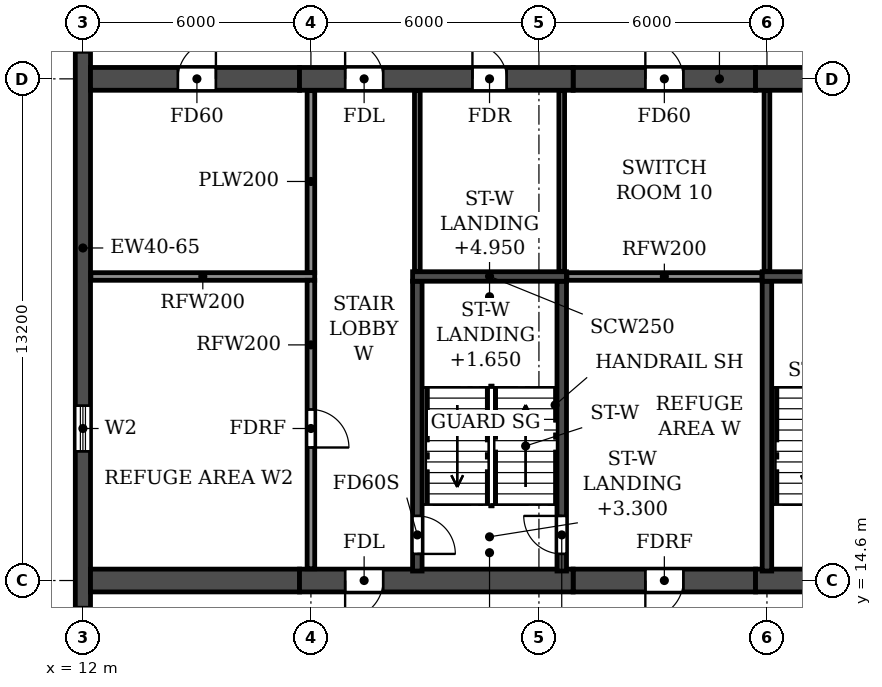
"""IFC4 building model, lengths in metres.
Left out: names, types, materials, properties, quantities, classifications, styles, units other than length and angle.
Written with IfcOpenShell. Run it as: python <this file> out.ifc"""

import sys

from ifc_helpers import new_model, si_unit, direction, frame, frame_2d, origin, place, context, subcontext, project, spatial, rectangle, extrude, element, fill, save


model = new_model("IFC4")
c1 = context("Model", 3, precision=1e-05, world=origin(), true_north=direction((0.0, 1.0)))
c2 = subcontext(c1, "Body", "Model", "MODEL_VIEW")
j1 = project(units=[si_unit("LENGTHUNIT", "METRE"), si_unit("PLANEANGLEUNIT", "RADIAN")], contexts=[c1])
p1 = place(None, origin())
s1 = spatial("IfcSite", under=j1, at=p1, CompositionType="ELEMENT")
p2 = place(p1, origin())
s2 = spatial("IfcBuilding", under=s1, at=p2, CompositionType="ELEMENT")
p3 = place(p2, frame((0.0, 0.0, 115.8)))
s3 = spatial("IfcBuildingStorey", under=s2, at=p3, CompositionType="ELEMENT", Elevation=115.8)
p4 = place(p3, frame((12.0, 4.683, 0.0), z_axis=(0.0, 0.0, 1.0), x_axis=(0.0, 1.0, 0.0)))
e1 = element("IfcWall", 1, at=p4, inside=s3, PredefinedType="SHEAR", context=c2, shape_type="SweptSolid", body=[
    extrude(rectangle(XDim=34.234, YDim=0.4, at=frame_2d((17.117, 0.0))), origin(), (0.0, 0.0, 1.0), 6.37),
])
p5 = place(p4, frame((23.817, 0.0, 0.9)))
e2 = element("IfcOpeningElement", 2, at=p5, cuts=e1, PredefinedType="OPENING", context=c2, shape_type="SweptSolid", body=[
    extrude(rectangle(XDim=1.2, YDim=1.5, at=frame_2d((0.6, 0.75))), frame((0.0, 0.21, 0.0), z_axis=(0.0, -1.0, 0.0), x_axis=(1.0, 0.0, 0.0)), (0.0, 0.0, 1.0), 0.42),
])
p6 = place(p4, frame((8.017, 0.0, 0.9)))
e3 = element("IfcOpeningElement", 3, at=p6, cuts=e1, PredefinedType="OPENING", context=c2, shape_type="SweptSolid", body=[
    extrude(rectangle(XDim=1.2, YDim=1.5, at=frame_2d((0.6, 0.75))), frame((0.0, 0.21, 0.0), z_axis=(0.0, -1.0, 0.0), x_axis=(1.0, 0.0, 0.0)), (0.0, 0.0, 1.0), 0.42),
])
p7 = place(p4, frame((13.317, 0.0, 0.9)))
e4 = element("IfcOpeningElement", 4, at=p7, cuts=e1, PredefinedType="OPENING", context=c2, shape_type="SweptSolid", body=[
    extrude(rectangle(XDim=1.2, YDim=1.5, at=frame_2d((0.6, 0.75))), frame((0.0, 0.21, 0.0), z_axis=(0.0, -1.0, 0.0), x_axis=(1.0, 0.0, 0.0)), (0.0, 0.0, 1.0), 0.42),
])
p8 = place(p3, frame((12.2, 14.6, 0.0), z_axis=(0.0, 0.0, 1.0), x_axis=(1.0, 0.0, 0.0)))
e5 = element("IfcWall", 5, at=p8, inside=s3, PredefinedType="SHEAR", context=c2, shape_type="SweptSolid", body=[
    extrude(rectangle(XDim=5.5, YDim=0.6, at=frame_2d((2.75, 0.0))), origin(), (0.0, 0.0, 1.0), 6.37),
])
p9 = place(p3, frame((24.9, 14.6, 0.0), z_axis=(0.0, 0.0, 1.0), x_axis=(1.0, 0.0, 0.0)))
e6 = element("IfcWall", 6, at=p9, inside=s3, PredefinedType="SHEAR", context=c2, shape_type="SweptSolid", body=[
    extrude(rectangle(XDim=4.8, YDim=0.6, at=frame_2d((2.4, 0.0))), origin(), (0.0, 0.0, 1.0), 6.37),
])
p10 = place(p9, frame((1.9, 0.0, 0.0)))
e7 = element("IfcOpeningElement", 7, at=p10, cuts=e6, PredefinedType="OPENING", context=c2, shape_type="SweptSolid", body=[
    extrude(rectangle(XDim=1.0, YDim=2.1, at=frame_2d((0.5, 1.05))), frame((0.0, 0.31, 0.0), z_axis=(0.0, -1.0, 0.0), x_axis=(1.0, 0.0, 0.0)), (0.0, 0.0, 1.0), 0.62),
])
p11 = place(p3, frame((12.2, 27.8, 0.0), z_axis=(0.0, 0.0, 1.0), x_axis=(1.0, 0.0, 0.0)))
e8 = element("IfcWall", 8, at=p11, inside=s3, PredefinedType="SHEAR", context=c2, shape_type="SweptSolid", body=[
    extrude(rectangle(XDim=5.5, YDim=0.6, at=frame_2d((2.75, 0.0))), origin(), (0.0, 0.0, 1.0), 6.37),
])
p12 = place(p11, frame((2.3, 0.0, 0.0)))
e9 = element("IfcOpeningElement", 9, at=p12, cuts=e8, PredefinedType="OPENING", context=c2, shape_type="SweptSolid", body=[
    extrude(rectangle(XDim=1.0, YDim=2.1, at=frame_2d((0.5, 1.05))), frame((0.0, 0.31, 0.0), z_axis=(0.0, -1.0, 0.0), x_axis=(1.0, 0.0, 0.0)), (0.0, 0.0, 1.0), 0.62),
])
p13 = place(p3, frame((24.9, 27.8, 0.0), z_axis=(0.0, 0.0, 1.0), x_axis=(1.0, 0.0, 0.0)))
e10 = element("IfcWall", 10, at=p13, inside=s3, PredefinedType="SHEAR", context=c2, shape_type="SweptSolid", body=[
    extrude(rectangle(XDim=4.8, YDim=0.6, at=frame_2d((2.4, 0.0))), origin(), (0.0, 0.0, 1.0), 6.37),
])
p14 = place(p13, frame((1.9, 0.0, 0.0)))
e11 = element("IfcOpeningElement", 11, at=p14, cuts=e10, PredefinedType="OPENING", context=c2, shape_type="SweptSolid", body=[
    extrude(rectangle(XDim=1.0, YDim=2.1, at=frame_2d((0.5, 1.05))), frame((0.0, 0.31, 0.0), z_axis=(0.0, -1.0, 0.0), x_axis=(1.0, 0.0, 0.0)), (0.0, 0.0, 1.0), 0.62),
])
p15 = place(p3, frame((17.7, 14.6, 0.0), z_axis=(0.0, 0.0, 1.0), x_axis=(1.0, 0.0, 0.0)))
e12 = element("IfcWall", 12, at=p15, inside=s3, PredefinedType="SOLIDWALL", context=c2, shape_type="SweptSolid", body=[
    extrude(rectangle(XDim=7.2, YDim=0.6, at=frame_2d((3.6, 0.0))), origin(), (0.0, 0.0, 1.0), 6.37),
])
p16 = place(p15, frame((1.2, 0.0, 0.0)))
e13 = element("IfcOpeningElement", 13, at=p16, cuts=e12, PredefinedType="OPENING", context=c2, shape_type="SweptSolid", body=[
    extrude(rectangle(XDim=1.0, YDim=2.1, at=frame_2d((0.5, 1.05))), frame((0.0, 0.31, 0.0), z_axis=(0.0, -1.0, 0.0), x_axis=(1.0, 0.0, 0.0)), (0.0, 0.0, 1.0), 0.62),
])
p17 = place(p3, frame((29.7, 14.6, 0.0), z_axis=(0.0, 0.0, 1.0), x_axis=(1.0, 0.0, 0.0)))
e14 = element("IfcWall", 14, at=p17, inside=s3, PredefinedType="SOLIDWALL", context=c2, shape_type="SweptSolid", body=[
    extrude(rectangle(XDim=42.6, YDim=0.6, at=frame_2d((21.3, 0.0))), origin(), (0.0, 0.0, 1.0), 6.37),
])
p18 = place(p17, frame((1.7, 0.0, 0.0)))
e15 = element("IfcOpeningElement", 15, at=p18, cuts=e14, PredefinedType="OPENING", context=c2, shape_type="SweptSolid", body=[
    extrude(rectangle(XDim=1.0, YDim=2.1, at=frame_2d((0.5, 1.05))), frame((0.0, 0.31, 0.0), z_axis=(0.0, -1.0, 0.0), x_axis=(1.0, 0.0, 0.0)), (0.0, 0.0, 1.0), 0.62),
])
p19 = place(p17, frame((14.3, 0.0, 0.0)))
e16 = element("IfcOpeningElement", 16, at=p19, cuts=e14, PredefinedType="OPENING", context=c2, shape_type="SweptSolid", body=[
    extrude(rectangle(XDim=1.0, YDim=2.1, at=frame_2d((0.5, 1.05))), frame((0.0, 0.31, 0.0), z_axis=(0.0, -1.0, 0.0), x_axis=(1.0, 0.0, 0.0)), (0.0, 0.0, 1.0), 0.62),
])
p20 = place(p17, frame((18.2, 0.0, 0.0)))
e17 = element("IfcOpeningElement", 17, at=p20, cuts=e14, PredefinedType="OPENING", context=c2, shape_type="SweptSolid", body=[
    extrude(rectangle(XDim=1.0, YDim=2.1, at=frame_2d((0.5, 1.05))), frame((0.0, 0.31, 0.0), z_axis=(0.0, -1.0, 0.0), x_axis=(1.0, 0.0, 0.0)), (0.0, 0.0, 1.0), 0.62),
])
p21 = place(p17, frame((20.8, 0.0, 0.0)))
e18 = element("IfcOpeningElement", 18, at=p21, cuts=e14, PredefinedType="OPENING", context=c2, shape_type="SweptSolid", body=[
    extrude(rectangle(XDim=1.0, YDim=2.1, at=frame_2d((0.5, 1.05))), frame((0.0, 0.31, 0.0), z_axis=(0.0, -1.0, 0.0), x_axis=(1.0, 0.0, 0.0)), (0.0, 0.0, 1.0), 0.62),
])
p22 = place(p17, frame((26.0, 0.0, 0.0)))
e19 = element("IfcOpeningElement", 19, at=p22, cuts=e14, PredefinedType="OPENING", context=c2, shape_type="SweptSolid", body=[
    extrude(rectangle(XDim=1.0, YDim=2.1, at=frame_2d((0.5, 1.05))), frame((0.0, 0.31, 0.0), z_axis=(0.0, -1.0, 0.0), x_axis=(1.0, 0.0, 0.0)), (0.0, 0.0, 1.0), 0.62),
])
p23 = place(p17, frame((39.9, 0.0, 0.0)))
e20 = element("IfcOpeningElement", 20, at=p23, cuts=e14, PredefinedType="OPENING", context=c2, shape_type="SweptSolid", body=[
    extrude(rectangle(XDim=1.0, YDim=2.1, at=frame_2d((0.5, 1.05))), frame((0.0, 0.31, 0.0), z_axis=(0.0, -1.0, 0.0), x_axis=(1.0, 0.0, 0.0)), (0.0, 0.0, 1.0), 0.62),
])
p24 = place(p3, frame((17.7, 27.8, 0.0), z_axis=(0.0, 0.0, 1.0), x_axis=(1.0, 0.0, 0.0)))
e21 = element("IfcWall", 21, at=p24, inside=s3, PredefinedType="SOLIDWALL", context=c2, shape_type="SweptSolid", body=[
    extrude(rectangle(XDim=7.2, YDim=0.6, at=frame_2d((3.6, 0.0))), origin(), (0.0, 0.0, 1.0), 6.37),
])
p25 = place(p24, frame((1.2, 0.0, 0.0)))
e22 = element("IfcOpeningElement", 22, at=p25, cuts=e21, PredefinedType="OPENING", context=c2, shape_type="SweptSolid", body=[
    extrude(rectangle(XDim=1.0, YDim=2.1, at=frame_2d((0.5, 1.05))), frame((0.0, 0.31, 0.0), z_axis=(0.0, -1.0, 0.0), x_axis=(1.0, 0.0, 0.0)), (0.0, 0.0, 1.0), 0.62),
])
p26 = place(p24, frame((4.55, 0.0, 0.0)))
e23 = element("IfcOpeningElement", 23, at=p26, cuts=e21, PredefinedType="OPENING", context=c2, shape_type="SweptSolid", body=[
    extrude(rectangle(XDim=0.9, YDim=2.1, at=frame_2d((0.45, 1.05))), frame((0.0, 0.31, 0.0), z_axis=(0.0, -1.0, 0.0), x_axis=(1.0, 0.0, 0.0)), (0.0, 0.0, 1.0), 0.62),
])
p27 = place(p3, frame((29.7, 27.8, 0.0), z_axis=(0.0, 0.0, 1.0), x_axis=(1.0, 0.0, 0.0)))
e24 = element("IfcWall", 24, at=p27, inside=s3, PredefinedType="SOLIDWALL", context=c2, shape_type="SweptSolid", body=[
    extrude(rectangle(XDim=42.6, YDim=0.6, at=frame_2d((21.3, 0.0))), origin(), (0.0, 0.0, 1.0), 6.37),
])
p28 = place(p27, frame((1.75, 0.0, 0.0)))
e25 = element("IfcOpeningElement", 25, at=p28, cuts=e24, PredefinedType="OPENING", context=c2, shape_type="SweptSolid", body=[
    extrude(rectangle(XDim=0.9, YDim=2.1, at=frame_2d((0.45, 1.05))), frame((0.0, 0.31, 0.0), z_axis=(0.0, -1.0, 0.0), x_axis=(1.0, 0.0, 0.0)), (0.0, 0.0, 1.0), 0.62),
])
p29 = place(p27, frame((6.2, 0.0, 0.0)))
e26 = element("IfcOpeningElement", 26, at=p29, cuts=e24, PredefinedType="OPENING", context=c2, shape_type="SweptSolid", body=[
    extrude(rectangle(XDim=1.0, YDim=2.1, at=frame_2d((0.5, 1.05))), frame((0.0, 0.31, 0.0), z_axis=(0.0, -1.0, 0.0), x_axis=(1.0, 0.0, 0.0)), (0.0, 0.0, 1.0), 0.62),
])
p30 = place(p27, frame((11.4, 0.0, 0.0)))
e27 = element("IfcOpeningElement", 27, at=p30, cuts=e24, PredefinedType="OPENING", context=c2, shape_type="SweptSolid", body=[
    extrude(rectangle(XDim=1.0, YDim=2.1, at=frame_2d((0.5, 1.05))), frame((0.0, 0.31, 0.0), z_axis=(0.0, -1.0, 0.0), x_axis=(1.0, 0.0, 0.0)), (0.0, 0.0, 1.0), 0.62),
])
p31 = place(p27, frame((17.9, 0.0, 0.0)))
e28 = element("IfcOpeningElement", 28, at=p31, cuts=e24, PredefinedType="OPENING", context=c2, shape_type="SweptSolid", body=[
    extrude(rectangle(XDim=1.0, YDim=2.1, at=frame_2d((0.5, 1.05))), frame((0.0, 0.31, 0.0), z_axis=(0.0, -1.0, 0.0), x_axis=(1.0, 0.0, 0.0)), (0.0, 0.0, 1.0), 0.62),
])
p32 = place(p27, frame((20.8, 0.0, 0.0)))
e29 = element("IfcOpeningElement", 29, at=p32, cuts=e24, PredefinedType="OPENING", context=c2, shape_type="SweptSolid", body=[
    extrude(rectangle(XDim=1.0, YDim=2.1, at=frame_2d((0.5, 1.05))), frame((0.0, 0.31, 0.0), z_axis=(0.0, -1.0, 0.0), x_axis=(1.0, 0.0, 0.0)), (0.0, 0.0, 1.0), 0.62),
])
p33 = place(p27, frame((25.0, 0.0, 0.0)))
e30 = element("IfcOpeningElement", 30, at=p33, cuts=e24, PredefinedType="OPENING", context=c2, shape_type="SweptSolid", body=[
    extrude(rectangle(XDim=1.0, YDim=2.1, at=frame_2d((0.5, 1.05))), frame((0.0, 0.31, 0.0), z_axis=(0.0, -1.0, 0.0), x_axis=(1.0, 0.0, 0.0)), (0.0, 0.0, 1.0), 0.62),
])
p34 = place(p27, frame((30.2, 0.0, 0.0)))
e31 = element("IfcOpeningElement", 31, at=p34, cuts=e24, PredefinedType="OPENING", context=c2, shape_type="SweptSolid", body=[
    extrude(rectangle(XDim=1.0, YDim=2.1, at=frame_2d((0.5, 1.05))), frame((0.0, 0.31, 0.0), z_axis=(0.0, -1.0, 0.0), x_axis=(1.0, 0.0, 0.0)), (0.0, 0.0, 1.0), 0.62),
])
p35 = place(p27, frame((35.15, 0.0, 0.0)))
e32 = element("IfcOpeningElement", 32, at=p35, cuts=e24, PredefinedType="OPENING", context=c2, shape_type="SweptSolid", body=[
    extrude(rectangle(XDim=1.5, YDim=2.1, at=frame_2d((0.75, 1.05))), frame((0.0, 0.31, 0.0), z_axis=(0.0, -1.0, 0.0), x_axis=(1.0, 0.0, 0.0)), (0.0, 0.0, 1.0), 0.62),
])
p36 = place(p27, frame((39.95, 0.0, 0.0)))
e33 = element("IfcOpeningElement", 33, at=p36, cuts=e24, PredefinedType="OPENING", context=c2, shape_type="SweptSolid", body=[
    extrude(rectangle(XDim=0.9, YDim=2.1, at=frame_2d((0.45, 1.05))), frame((0.0, 0.31, 0.0), z_axis=(0.0, -1.0, 0.0), x_axis=(1.0, 0.0, 0.0)), (0.0, 0.0, 1.0), 0.62),
])
p37 = place(p3, frame((30.0, 14.85, 0.0), z_axis=(0.0, 0.0, 1.0), x_axis=(0.0, 1.0, 0.0)))
e34 = element("IfcWall", 34, at=p37, inside=s3, PredefinedType="SOLIDWALL", context=c2, shape_type="SweptSolid", body=[
    extrude(rectangle(XDim=7.625, YDim=0.25, at=frame_2d((3.812, 0.0))), origin(), (0.0, 0.0, 1.0), 6.37),
])
p38 = place(p3, frame((29.875, 22.6, 0.0), z_axis=(0.0, 0.0, 1.0), x_axis=(1.0, 0.0, 0.0)))
e35 = element("IfcWall", 35, at=p38, inside=s3, PredefinedType="SOLIDWALL", context=c2, shape_type="SweptSolid", body=[
    extrude(rectangle(XDim=4.05, YDim=0.25, at=frame_2d((2.025, 0.0))), origin(), (0.0, 0.0, 1.0), 6.37),
])
p39 = place(p3, frame((20.8, 14.85, 0.0), z_axis=(0.0, 0.0, 1.0), x_axis=(0.0, 1.0, 0.0)))
e36 = element("IfcWall", 36, at=p39, inside=s3, PredefinedType="SOLIDWALL", context=c2, shape_type="SweptSolid", body=[
    extrude(rectangle(XDim=7.625, YDim=0.25, at=frame_2d((3.812, 0.0))), origin(), (0.0, 0.0, 1.0), 6.37),
])
p40 = place(p39, frame((0.45, 0.0, 0.0)))
e37 = element("IfcOpeningElement", 37, at=p40, cuts=e36, PredefinedType="OPENING", context=c2, shape_type="SweptSolid", body=[
    extrude(rectangle(XDim=1.0, YDim=2.1, at=frame_2d((0.5, 1.05))), frame((0.0, 0.135, 0.0), z_axis=(0.0, -1.0, 0.0), x_axis=(1.0, 0.0, 0.0)), (0.0, 0.0, 1.0), 0.27),
])
p41 = place(p3, frame((24.6, 14.85, 0.0), z_axis=(0.0, 0.0, 1.0), x_axis=(0.0, 1.0, 0.0)))
e38 = element("IfcWall", 38, at=p41, inside=s3, PredefinedType="SOLIDWALL", context=c2, shape_type="SweptSolid", body=[
    extrude(rectangle(XDim=7.625, YDim=0.25, at=frame_2d((3.812, 0.0))), origin(), (0.0, 0.0, 1.0), 6.37),
])
p42 = place(p41, frame((0.45, 0.0, 0.0)))
e39 = element("IfcOpeningElement", 39, at=p42, cuts=e38, PredefinedType="OPENING", context=c2, shape_type="SweptSolid", body=[
    extrude(rectangle(XDim=1.0, YDim=2.1, at=frame_2d((0.5, 1.05))), frame((0.0, 0.135, 0.0), z_axis=(0.0, -1.0, 0.0), x_axis=(1.0, 0.0, 0.0)), (0.0, 0.0, 1.0), 0.27),
])
p43 = place(p3, frame((20.675, 22.6, 0.0), z_axis=(0.0, 0.0, 1.0), x_axis=(1.0, 0.0, 0.0)))
e40 = element("IfcWall", 40, at=p43, inside=s3, PredefinedType="SOLIDWALL", context=c2, shape_type="SweptSolid", body=[
    extrude(rectangle(XDim=4.05, YDim=0.25, at=frame_2d((2.025, 0.0))), origin(), (0.0, 0.0, 1.0), 6.37),
])
p44 = place(p3, frame((18.0, 22.7, 0.0), z_axis=(0.0, 0.0, 1.0), x_axis=(0.0, 1.0, 0.0)))
e41 = element("IfcWall", 41, at=p44, inside=s3, PredefinedType="PARTITIONING", context=c2, shape_type="SweptSolid", body=[
    extrude(rectangle(XDim=4.79, YDim=0.2, at=frame_2d((2.395, 0.0))), origin(), (0.0, 0.0, 1.0), 6.37),
])
p45 = place(p3, frame((12.21, 22.6, 0.0), z_axis=(0.0, 0.0, 1.0), x_axis=(1.0, 0.0, 0.0)))
e42 = element("IfcWall", 42, at=p45, inside=s3, PredefinedType="PARTITIONING", context=c2, shape_type="SweptSolid", body=[
    extrude(rectangle(XDim=5.89, YDim=0.2, at=frame_2d((2.945, 0.0))), origin(), (0.0, 0.0, 1.0), 6.37),
])
p46 = place(p3, frame((24.735, 22.6, 0.0), z_axis=(0.0, 0.0, 1.0), x_axis=(1.0, 0.0, 0.0)))
e43 = element("IfcWall", 43, at=p46, inside=s3, PredefinedType="PARTITIONING", context=c2, shape_type="SweptSolid", body=[
    extrude(rectangle(XDim=5.13, YDim=0.2, at=frame_2d((2.565, 0.0))), origin(), (0.0, 0.0, 1.0), 6.37),
])
p47 = place(p3, frame((18.0, 14.91, 0.0), z_axis=(0.0, 0.0, 1.0), x_axis=(0.0, 1.0, 0.0)))
e44 = element("IfcWall", 44, at=p47, inside=s3, PredefinedType="PARTITIONING", context=c2, shape_type="SweptSolid", body=[
    extrude(rectangle(XDim=7.59, YDim=0.2, at=frame_2d((3.795, 0.0))), origin(), (0.0, 0.0, 1.0), 6.37),
])
p48 = place(p47, frame((3.19, 0.0, 0.0)))
e45 = element("IfcOpeningElement", 45, at=p48, cuts=e44, PredefinedType="OPENING", context=c2, shape_type="SweptSolid", body=[
    extrude(rectangle(XDim=1.0, YDim=2.1, at=frame_2d((0.5, 1.05))), frame((0.0, 0.11, 0.0), z_axis=(0.0, -1.0, 0.0), x_axis=(1.0, 0.0, 0.0)), (0.0, 0.0, 1.0), 0.22),
])
for number, where, z_axis, x_axis in (
    (46, (20.8, 22.735, 0.0), (0.0, 0.0, 1.0), (0.0, 1.0, 0.0)),
    (47, (24.6, 22.735, 0.0), (0.0, 0.0, 1.0), (0.0, 1.0, 0.0)),
    (48, (30.0, 22.735, 0.0), (0.0, 0.0, 1.0), (0.0, 1.0, 0.0)),
):
    element("IfcWall", number, at=place(p3, frame(where, z_axis=z_axis, x_axis=x_axis)), inside=s3, PredefinedType="PARTITIONING", context=c2, shape_type="SweptSolid", body=[
        extrude(rectangle(XDim=4.755, YDim=0.15, at=frame_2d((2.377, 0.0))), origin(), (0.0, 0.0, 1.0), 6.37),
    ])
p49 = place(p6, origin())
e49 = element("IfcWindow", 49, at=p49, inside=s3, PartitioningType="SINGLE_PANEL", PredefinedType="WINDOW", context=c2, shape_type="SweptSolid", body=[
    extrude(rectangle(XDim=1.2, YDim=1.5, at=frame_2d((0.6, 0.75))), frame((0.0, 0.03, 0.0), z_axis=(0.0, -1.0, 0.0), x_axis=(1.0, 0.0, 0.0)), (0.0, 0.0, 1.0), 0.06),
])
fill(e3, e49)
p50 = place(p7, origin())
e50 = element("IfcWindow", 50, at=p50, inside=s3, PartitioningType="SINGLE_PANEL", PredefinedType="WINDOW", context=c2, shape_type="SweptSolid", body=[
    extrude(rectangle(XDim=1.2, YDim=1.5, at=frame_2d((0.6, 0.75))), frame((0.0, 0.03, 0.0), z_axis=(0.0, -1.0, 0.0), x_axis=(1.0, 0.0, 0.0)), (0.0, 0.0, 1.0), 0.06),
])
fill(e4, e50)
p51 = place(p12, origin())
e51 = element("IfcDoor", 51, at=p51, inside=s3, OperationType="SINGLE_SWING_RIGHT", PredefinedType="DOOR", context=c2, shape_type="SweptSolid", body=[
    extrude(rectangle(XDim=1.0, YDim=2.1, at=frame_2d((0.5, 1.05))), frame((0.0, 0.025, 0.0), z_axis=(0.0, -1.0, 0.0), x_axis=(1.0, 0.0, 0.0)), (0.0, 0.0, 1.0), 0.05),
])
fill(e9, e51)
p52 = place(p25, origin())
e52 = element("IfcDoor", 52, at=p52, inside=s3, OperationType="SINGLE_SWING_LEFT", PredefinedType="DOOR", context=c2, shape_type="SweptSolid", body=[
    extrude(rectangle(XDim=1.0, YDim=2.1, at=frame_2d((0.5, 1.05))), frame((0.0, 0.025, 0.0), z_axis=(0.0, -1.0, 0.0), x_axis=(1.0, 0.0, 0.0)), (0.0, 0.0, 1.0), 0.05),
])
fill(e22, e52)
p53 = place(p26, origin())
e53 = element("IfcDoor", 53, at=p53, inside=s3, OperationType="SINGLE_SWING_LEFT", PredefinedType="DOOR", context=c2, shape_type="SweptSolid", body=[
    extrude(rectangle(XDim=0.9, YDim=2.1, at=frame_2d((0.45, 1.05))), frame((0.0, 0.025, 0.0), z_axis=(0.0, -1.0, 0.0), x_axis=(1.0, 0.0, 0.0)), (0.0, 0.0, 1.0), 0.05),
])
fill(e23, e53)
p54 = place(p14, origin())
e54 = element("IfcDoor", 54, at=p54, inside=s3, OperationType="SINGLE_SWING_LEFT", PredefinedType="DOOR", context=c2, shape_type="SweptSolid", body=[
    extrude(rectangle(XDim=1.0, YDim=2.1, at=frame_2d((0.5, 1.05))), frame((0.0, 0.025, 0.0), z_axis=(0.0, -1.0, 0.0), x_axis=(1.0, 0.0, 0.0)), (0.0, 0.0, 1.0), 0.05),
])
fill(e11, e54)
p55 = place(p16, frame((1.0, 0.0, 0.0), z_axis=(0.0, 0.0, 1.0), x_axis=(-1.0, 0.0, 0.0)))
e55 = element("IfcDoor", 55, at=p55, inside=s3, OperationType="SINGLE_SWING_RIGHT", PredefinedType="DOOR", context=c2, shape_type="SweptSolid", body=[
    extrude(rectangle(XDim=1.0, YDim=2.1, at=frame_2d((0.5, 1.05))), frame((0.0, 0.025, 0.0), z_axis=(0.0, -1.0, 0.0), x_axis=(1.0, 0.0, 0.0)), (0.0, 0.0, 1.0), 0.05),
])
fill(e13, e55)
p56 = place(p10, frame((1.0, 0.0, 0.0), z_axis=(0.0, 0.0, 1.0), x_axis=(-1.0, 0.0, 0.0)))
e56 = element("IfcDoor", 56, at=p56, inside=s3, OperationType="SINGLE_SWING_RIGHT", PredefinedType="DOOR", context=c2, shape_type="SweptSolid", body=[
    extrude(rectangle(XDim=1.0, YDim=2.1, at=frame_2d((0.5, 1.05))), frame((0.0, 0.025, 0.0), z_axis=(0.0, -1.0, 0.0), x_axis=(1.0, 0.0, 0.0)), (0.0, 0.0, 1.0), 0.05),
])
fill(e7, e56)
p57 = place(p42, origin())
e57 = element("IfcDoor", 57, at=p57, inside=s3, OperationType="SINGLE_SWING_RIGHT", PredefinedType="DOOR", context=c2, shape_type="SweptSolid", body=[
    extrude(rectangle(XDim=1.0, YDim=2.1, at=frame_2d((0.5, 1.05))), frame((0.0, 0.025, 0.0), z_axis=(0.0, -1.0, 0.0), x_axis=(1.0, 0.0, 0.0)), (0.0, 0.0, 1.0), 0.05),
])
fill(e39, e57)
p58 = place(p48, frame((1.0, 0.0, 0.0), z_axis=(0.0, 0.0, 1.0), x_axis=(-1.0, 0.0, 0.0)))
e58 = element("IfcDoor", 58, at=p58, inside=s3, OperationType="SINGLE_SWING_RIGHT", PredefinedType="DOOR", context=c2, shape_type="SweptSolid", body=[
    extrude(rectangle(XDim=1.0, YDim=2.1, at=frame_2d((0.5, 1.05))), frame((0.0, 0.025, 0.0), z_axis=(0.0, -1.0, 0.0), x_axis=(1.0, 0.0, 0.0)), (0.0, 0.0, 1.0), 0.05),
])
fill(e45, e58)
p59 = place(p40, frame((1.0, 0.0, 0.0), z_axis=(0.0, 0.0, 1.0), x_axis=(-1.0, 0.0, 0.0)))
e59 = element("IfcDoor", 59, at=p59, inside=s3, OperationType="SINGLE_SWING_RIGHT", PredefinedType="DOOR", context=c2, shape_type="SweptSolid", body=[
    extrude(rectangle(XDim=1.0, YDim=2.1, at=frame_2d((0.5, 1.05))), frame((0.0, 0.025, 0.0), z_axis=(0.0, -1.0, 0.0), x_axis=(1.0, 0.0, 0.0)), (0.0, 0.0, 1.0), 0.05),
])
fill(e37, e59)
save(model, sys.argv[1])
